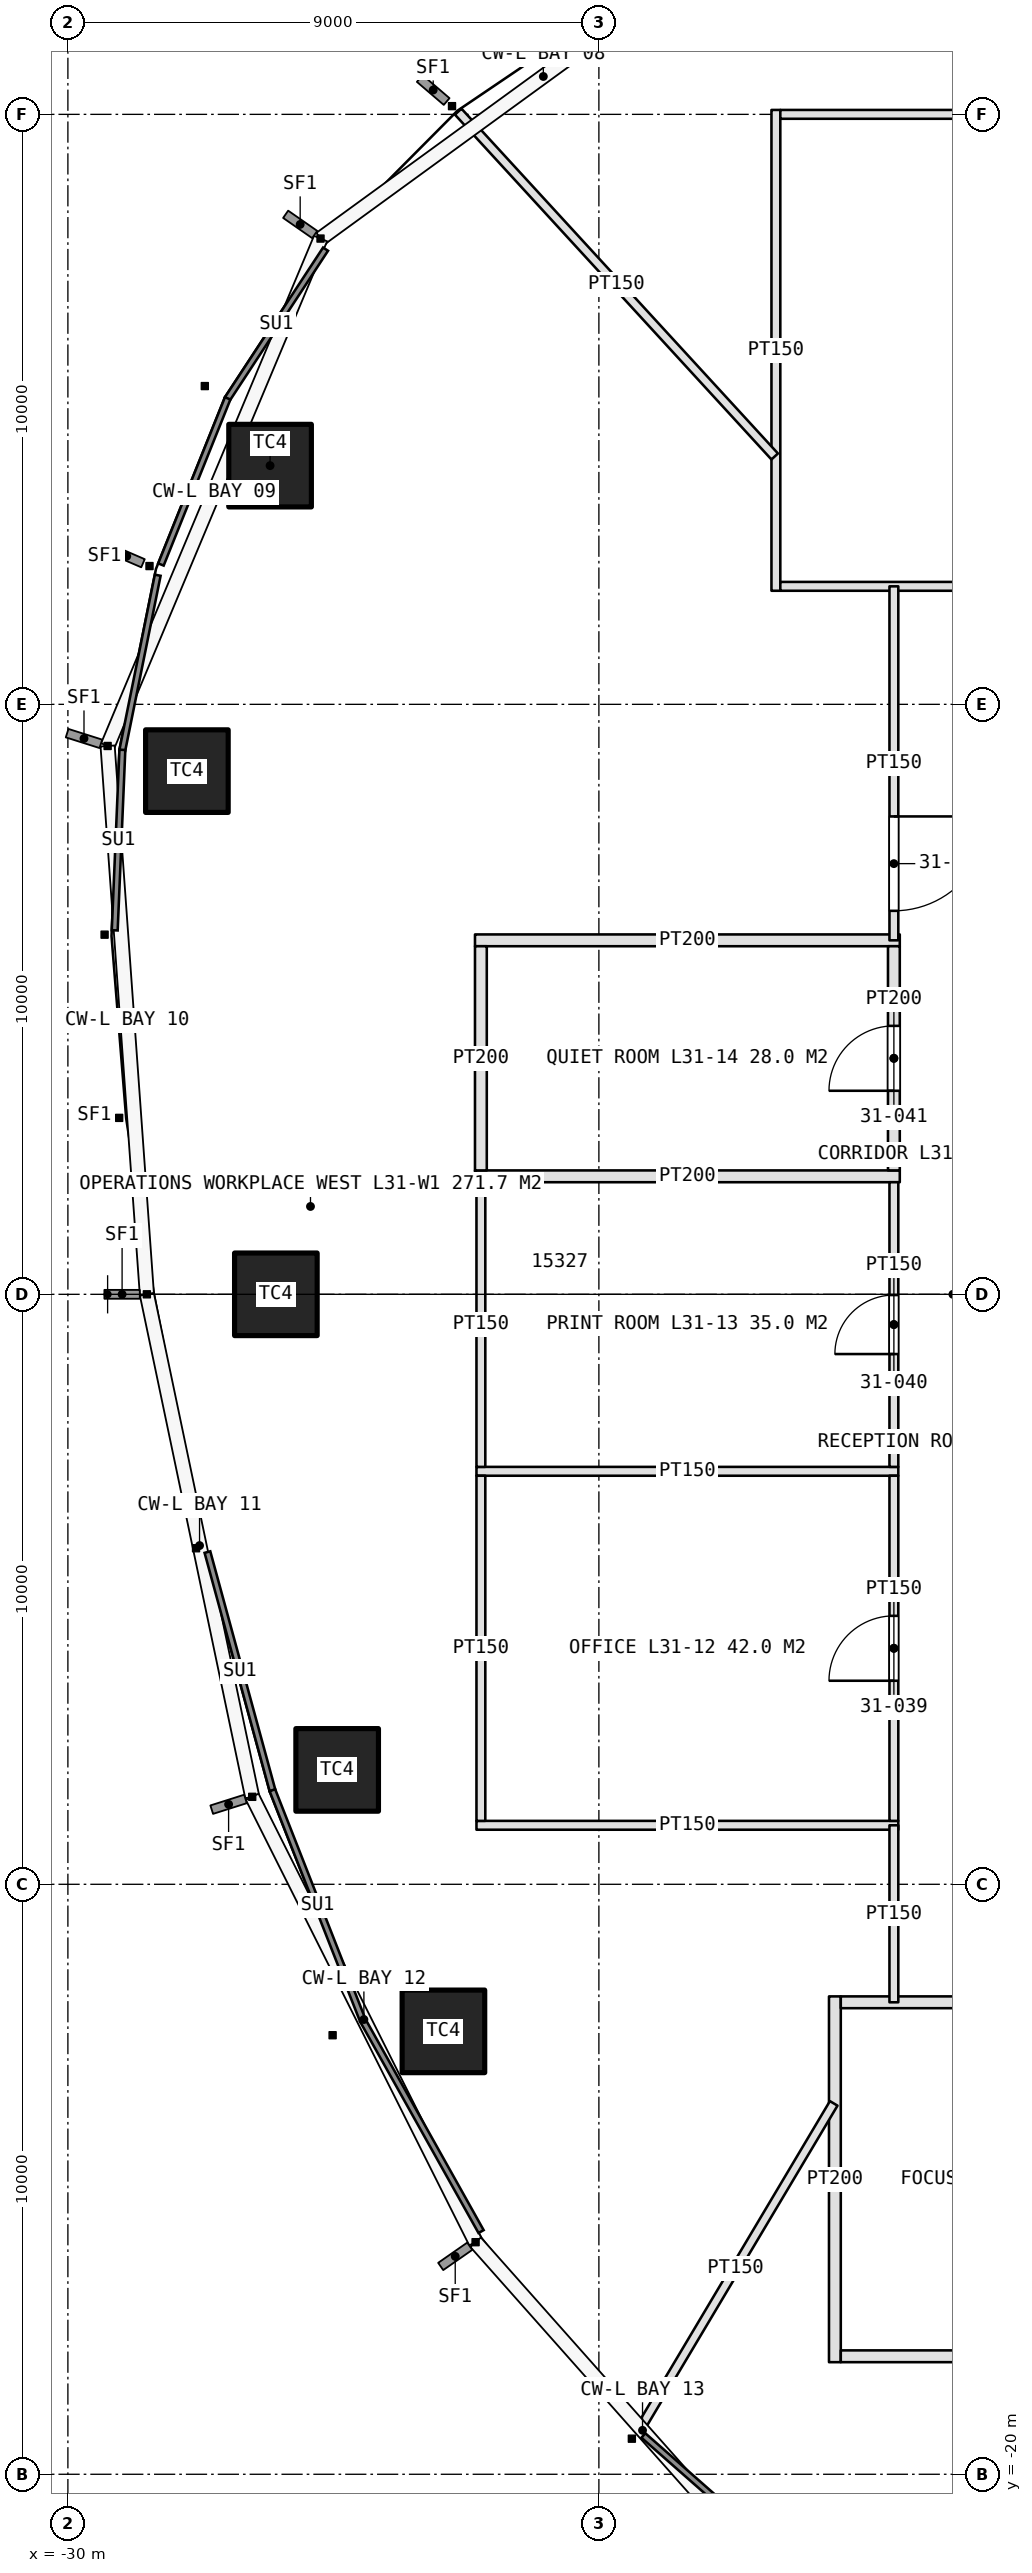
"""IFC4 building model, lengths in metres.
Left out: names, types, materials, properties, quantities, classifications, styles, units other than length and angle.
Written with IfcOpenShell. Run it as: python <this file> out.ifc"""

import sys

from ifc_helpers import new_model, si_unit, direction, frame, frame_2d, origin, origin_2d, place, context, subcontext, project, spatial, rectangle, extrude, element, fill, save


model = new_model("IFC4")
c1 = context("Model", 3, precision=1e-05, world=origin(), true_north=direction((0.0, 1.0)))
c2 = subcontext(c1, "Body", "Model", "MODEL_VIEW")
j1 = project(units=[si_unit("LENGTHUNIT", "METRE"), si_unit("PLANEANGLEUNIT", "RADIAN")], contexts=[c1])
p1 = place(None, origin())
s1 = spatial("IfcSite", under=j1, at=p1, CompositionType="ELEMENT")
p2 = place(p1, origin())
s2 = spatial("IfcBuilding", under=s1, at=p2, CompositionType="ELEMENT")
p3 = place(p2, frame((0.0, 0.0, 147.0)))
s3 = spatial("IfcBuildingStorey", under=s2, at=p3, CompositionType="ELEMENT", Elevation=147.0)
for number, where, z_axis, x_axis in (
    (1, (-26.573, 14.046, 0.0), (0.0, 0.0, 1.0), (1.0, 0.0, 0.0)),
    (2, (-27.983, 8.868, 0.0), (0.0, 0.0, 1.0), (1.0, 0.0, 0.0)),
    (3, (-26.475, 0.0, 0.0), (0.0, 0.0, 1.0), (1.0, 0.0, 0.0)),
    (4, (-25.436, -8.061, 0.0), (0.0, 0.0, 1.0), (1.0, 0.0, 0.0)),
    (5, (-23.635, -12.493, 0.0), (0.0, 0.0, 1.0), (1.0, 0.0, 0.0)),
):
    element("IfcColumn", number, at=place(p3, frame(where, z_axis=z_axis, x_axis=x_axis)), inside=s3, PredefinedType="COLUMN", context=c2, shape_type="SweptSolid", body=[
        extrude(rectangle(XDim=1.4, YDim=1.4, at=origin_2d()), origin(), (0.0, 0.0, 1.0), 4.2),
    ])
p4 = place(p3, frame((-18.0, 11.925, 0.0), z_axis=(0.0, 0.0, 1.0), x_axis=(0.0, 1.0, 0.0)))
e6 = element("IfcWall", 6, at=p4, inside=s3, PredefinedType="PARTITIONING", context=c2, shape_type="SweptSolid", body=[
    extrude(rectangle(XDim=8.15, YDim=0.15, at=frame_2d((4.075, 0.0))), origin(), (0.0, 0.0, 1.0), 3.0),
])
p5 = place(p3, frame((-17.925, 12.0, 0.0), z_axis=(0.0, 0.0, 1.0), x_axis=(1.0, 0.0, 0.0)))
e7 = element("IfcWall", 7, at=p5, inside=s3, PredefinedType="PARTITIONING", context=c2, shape_type="SweptSolid", body=[
    extrude(rectangle(XDim=14.85, YDim=0.15, at=frame_2d((7.425, 0.0))), origin(), (0.0, 0.0, 1.0), 3.0),
])
p6 = place(p5, frame((6.825, 0.0, 0.0)))
e8 = element("IfcOpeningElement", 8, at=p6, cuts=e7, PredefinedType="OPENING", context=c2, shape_type="SweptSolid", body=[
    extrude(rectangle(XDim=1.2, YDim=2.4, at=frame_2d((0.6, 1.2))), frame((0.0, 0.085, 0.0), z_axis=(0.0, -1.0, 0.0), x_axis=(1.0, 0.0, 0.0)), (0.0, 0.0, 1.0), 0.17),
])
p7 = place(p3, frame((-17.925, 20.0, 0.0), z_axis=(0.0, 0.0, 1.0), x_axis=(1.0, 0.0, 0.0)))
e9 = element("IfcWall", 9, at=p7, inside=s3, PredefinedType="PARTITIONING", context=c2, shape_type="SweptSolid", body=[
    extrude(rectangle(XDim=14.85, YDim=0.15, at=frame_2d((7.425, 0.0))), origin(), (0.0, 0.0, 1.0), 3.0),
])
p8 = place(p3, frame((-17.0, -11.9, 0.0), z_axis=(0.0, 0.0, 1.0), x_axis=(0.0, -1.0, 0.0)))
e10 = element("IfcWall", 10, at=p8, inside=s3, PredefinedType="PARTITIONING", context=c2, shape_type="SweptSolid", body=[
    extrude(rectangle(XDim=6.2, YDim=0.2, at=frame_2d((3.1, 0.0))), origin(), (0.0, 0.0, 1.0), 3.0),
])
p9 = place(p3, frame((-16.9, -12.0, 0.0), z_axis=(0.0, 0.0, 1.0), x_axis=(1.0, 0.0, 0.0)))
e11 = element("IfcWall", 11, at=p9, inside=s3, PredefinedType="PARTITIONING", context=c2, shape_type="SweptSolid", body=[
    extrude(rectangle(XDim=6.8, YDim=0.2, at=frame_2d((3.4, 0.0))), origin(), (0.0, 0.0, 1.0), 3.0),
])
p10 = place(p9, frame((2.85, 0.0, 0.0)))
e12 = element("IfcOpeningElement", 12, at=p10, cuts=e11, PredefinedType="OPENING", context=c2, shape_type="SweptSolid", body=[
    extrude(rectangle(XDim=1.1, YDim=2.3, at=frame_2d((0.55, 1.15))), frame((0.0, 0.11, 0.0), z_axis=(0.0, -1.0, 0.0), x_axis=(1.0, 0.0, 0.0)), (0.0, 0.0, 1.0), 0.22),
])
p11 = place(p3, frame((-16.9, -18.0, 0.0), z_axis=(0.0, 0.0, 1.0), x_axis=(1.0, 0.0, 0.0)))
e13 = element("IfcWall", 13, at=p11, inside=s3, PredefinedType="PARTITIONING", context=c2, shape_type="SweptSolid", body=[
    extrude(rectangle(XDim=6.8, YDim=0.2, at=frame_2d((3.4, 0.0))), origin(), (0.0, 0.0, 1.0), 3.0),
])
for number, where, z_axis, x_axis in (
    (14, (-15.925, -9.0, 0.0), (0.0, 0.0, 1.0), (-1.0, 0.0, 0.0)),
    (15, (-15.925, -3.0, 0.0), (0.0, 0.0, 1.0), (-1.0, 0.0, 0.0)),
):
    element("IfcWall", number, at=place(p3, frame(where, z_axis=z_axis, x_axis=x_axis)), inside=s3, PredefinedType="PARTITIONING", context=c2, shape_type="SweptSolid", body=[
        extrude(rectangle(XDim=7.15, YDim=0.15, at=frame_2d((3.575, 0.0))), origin(), (0.0, 0.0, 1.0), 3.0),
    ])
for number, where, z_axis, x_axis in (
    (16, (-15.9, 2.0, 0.0), (0.0, 0.0, 1.0), (-1.0, 0.0, 0.0)),
    (17, (-15.9, 6.0, 0.0), (0.0, 0.0, 1.0), (-1.0, 0.0, 0.0)),
):
    element("IfcWall", number, at=place(p3, frame(where, z_axis=z_axis, x_axis=x_axis)), inside=s3, PredefinedType="PARTITIONING", context=c2, shape_type="SweptSolid", body=[
        extrude(rectangle(XDim=7.2, YDim=0.2, at=frame_2d((3.6, 0.0))), origin(), (0.0, 0.0, 1.0), 3.0),
    ])
p12 = place(p3, frame((-16.0, -8.925, 0.0), z_axis=(0.0, 0.0, 1.0), x_axis=(0.0, 1.0, 0.0)))
e18 = element("IfcWall", 18, at=p12, inside=s3, PredefinedType="PARTITIONING", context=c2, shape_type="SweptSolid", body=[
    extrude(rectangle(XDim=5.85, YDim=0.15, at=frame_2d((2.925, 0.0))), origin(), (0.0, 0.0, 1.0), 3.0),
])
p13 = place(p12, frame((2.375, 0.0, 0.0)))
e19 = element("IfcOpeningElement", 19, at=p13, cuts=e18, PredefinedType="OPENING", context=c2, shape_type="SweptSolid", body=[
    extrude(rectangle(XDim=1.1, YDim=2.3, at=frame_2d((0.55, 1.15))), frame((0.0, 0.085, 0.0), z_axis=(0.0, -1.0, 0.0), x_axis=(1.0, 0.0, 0.0)), (0.0, 0.0, 1.0), 0.17),
])
p14 = place(p3, frame((-23.0, -8.925, 0.0), z_axis=(0.0, 0.0, 1.0), x_axis=(0.0, 1.0, 0.0)))
e20 = element("IfcWall", 20, at=p14, inside=s3, PredefinedType="PARTITIONING", context=c2, shape_type="SweptSolid", body=[
    extrude(rectangle(XDim=5.85, YDim=0.15, at=frame_2d((2.925, 0.0))), origin(), (0.0, 0.0, 1.0), 3.0),
])
p15 = place(p3, frame((-16.0, -2.925, 0.0), z_axis=(0.0, 0.0, 1.0), x_axis=(0.0, 1.0, 0.0)))
e21 = element("IfcWall", 21, at=p15, inside=s3, PredefinedType="PARTITIONING", context=c2, shape_type="SweptSolid", body=[
    extrude(rectangle(XDim=4.825, YDim=0.15, at=frame_2d((2.413, 0.0))), origin(), (0.0, 0.0, 1.0), 3.0),
])
p16 = place(p15, frame((1.913, 0.0, 0.0)))
e22 = element("IfcOpeningElement", 22, at=p16, cuts=e21, PredefinedType="OPENING", context=c2, shape_type="SweptSolid", body=[
    extrude(rectangle(XDim=1.0, YDim=2.2, at=frame_2d((0.5, 1.1))), frame((0.0, 0.085, 0.0), z_axis=(0.0, -1.0, 0.0), x_axis=(1.0, 0.0, 0.0)), (0.0, 0.0, 1.0), 0.17),
])
p17 = place(p3, frame((-23.0, -2.925, 0.0), z_axis=(0.0, 0.0, 1.0), x_axis=(0.0, 1.0, 0.0)))
e23 = element("IfcWall", 23, at=p17, inside=s3, PredefinedType="PARTITIONING", context=c2, shape_type="SweptSolid", body=[
    extrude(rectangle(XDim=4.825, YDim=0.15, at=frame_2d((2.413, 0.0))), origin(), (0.0, 0.0, 1.0), 3.0),
])
p18 = place(p3, frame((-16.0, 2.1, 0.0), z_axis=(0.0, 0.0, 1.0), x_axis=(0.0, 1.0, 0.0)))
e24 = element("IfcWall", 24, at=p18, inside=s3, PredefinedType="PARTITIONING", context=c2, shape_type="SweptSolid", body=[
    extrude(rectangle(XDim=3.8, YDim=0.2, at=frame_2d((1.9, 0.0))), origin(), (0.0, 0.0, 1.0), 3.0),
])
p19 = place(p18, frame((1.35, 0.0, 0.0)))
e25 = element("IfcOpeningElement", 25, at=p19, cuts=e24, PredefinedType="OPENING", context=c2, shape_type="SweptSolid", body=[
    extrude(rectangle(XDim=1.1, YDim=2.3, at=frame_2d((0.55, 1.15))), frame((0.0, 0.11, 0.0), z_axis=(0.0, -1.0, 0.0), x_axis=(1.0, 0.0, 0.0)), (0.0, 0.0, 1.0), 0.22),
])
p20 = place(p3, frame((-23.0, 2.1, 0.0), z_axis=(0.0, 0.0, 1.0), x_axis=(0.0, 1.0, 0.0)))
e26 = element("IfcWall", 26, at=p20, inside=s3, PredefinedType="PARTITIONING", context=c2, shape_type="SweptSolid", body=[
    extrude(rectangle(XDim=3.8, YDim=0.2, at=frame_2d((1.9, 0.0))), origin(), (0.0, 0.0, 1.0), 3.0),
])
p21 = place(p3, frame((-17.02, -13.713, 0.0), z_axis=(0.0, 0.0, 1.0), x_axis=(-0.511508304982, -0.859278333216, 0.0)))
e27 = element("IfcWall", 27, at=p21, inside=s3, PredefinedType="PARTITIONING", context=c2, shape_type="SweptSolid", body=[
    extrude(rectangle(XDim=6.497, YDim=0.15, at=frame_2d((3.248, 0.0))), origin(), (0.0, 0.0, 1.0), 3.0),
])
p22 = place(p3, frame((-18.02, 14.201, 0.0), z_axis=(0.0, 0.0, 1.0), x_axis=(-0.676162058246, 0.736752923977, 0.0)))
e28 = element("IfcWall", 28, at=p22, inside=s3, PredefinedType="PARTITIONING", context=c2, shape_type="SweptSolid", body=[
    extrude(rectangle(XDim=7.934, YDim=0.15, at=frame_2d((3.967, 0.0))), origin(), (0.0, 0.0, 1.0), 3.0),
])
p23 = place(p3, frame((-16.0, -9.0, 0.0), z_axis=(0.0, 0.0, 1.0), x_axis=(0.0, -1.0, 0.0)))
e29 = element("IfcWall", 29, at=p23, inside=s3, PredefinedType="PARTITIONING", context=c2, shape_type="SweptSolid", body=[
    extrude(rectangle(XDim=3.0, YDim=0.15, at=frame_2d((1.5, 0.0))), origin(), (0.0, 0.0, 1.0), 3.0),
])
p24 = place(p3, frame((-16.0, 12.0, 0.0), z_axis=(0.0, 0.0, 1.0), x_axis=(0.0, -1.0, 0.0)))
e30 = element("IfcWall", 30, at=p24, inside=s3, PredefinedType="PARTITIONING", context=c2, shape_type="SweptSolid", body=[
    extrude(rectangle(XDim=6.0, YDim=0.15, at=frame_2d((3.0, 0.0))), origin(), (0.0, 0.0, 1.0), 3.0),
])
p25 = place(p24, frame((3.9, 0.0, 0.0)))
e31 = element("IfcOpeningElement", 31, at=p25, cuts=e30, PredefinedType="OPENING", context=c2, shape_type="SweptSolid", body=[
    extrude(rectangle(XDim=1.6, YDim=2.4, at=frame_2d((0.8, 1.2))), frame((0.0, 0.085, 0.0), z_axis=(0.0, -1.0, 0.0), x_axis=(1.0, 0.0, 0.0)), (0.0, 0.0, 1.0), 0.17),
])
p26 = place(p13, origin())
e32 = element("IfcDoor", 32, at=p26, inside=s3, OperationType="SINGLE_SWING_LEFT", PredefinedType="DOOR", context=c2, shape_type="SweptSolid", body=[
    extrude(rectangle(XDim=1.1, YDim=2.3, at=frame_2d((0.55, 1.15))), frame((0.0, 0.025, 0.0), z_axis=(0.0, -1.0, 0.0), x_axis=(1.0, 0.0, 0.0)), (0.0, 0.0, 1.0), 0.05),
])
fill(e19, e32)
p27 = place(p16, origin())
e33 = element("IfcDoor", 33, at=p27, inside=s3, OperationType="SINGLE_SWING_LEFT", PredefinedType="DOOR", context=c2, shape_type="SweptSolid", body=[
    extrude(rectangle(XDim=1.0, YDim=2.2, at=frame_2d((0.5, 1.1))), frame((0.0, 0.025, 0.0), z_axis=(0.0, -1.0, 0.0), x_axis=(1.0, 0.0, 0.0)), (0.0, 0.0, 1.0), 0.05),
])
fill(e22, e33)
p28 = place(p19, origin())
e34 = element("IfcDoor", 34, at=p28, inside=s3, OperationType="SINGLE_SWING_LEFT", PredefinedType="DOOR", context=c2, shape_type="SweptSolid", body=[
    extrude(rectangle(XDim=1.1, YDim=2.3, at=frame_2d((0.55, 1.15))), frame((0.0, 0.025, 0.0), z_axis=(0.0, -1.0, 0.0), x_axis=(1.0, 0.0, 0.0)), (0.0, 0.0, 1.0), 0.05),
])
fill(e25, e34)
p29 = place(p25, origin())
e35 = element("IfcDoor", 35, at=p29, inside=s3, OperationType="DOUBLE_DOOR_SINGLE_SWING", PredefinedType="DOOR", context=c2, shape_type="SweptSolid", body=[
    extrude(rectangle(XDim=1.6, YDim=2.4, at=frame_2d((0.8, 1.2))), frame((0.0, 0.025, 0.0), z_axis=(0.0, -1.0, 0.0), x_axis=(1.0, 0.0, 0.0)), (0.0, 0.0, 1.0), 0.05),
])
fill(e31, e35)
save(model, sys.argv[1])
